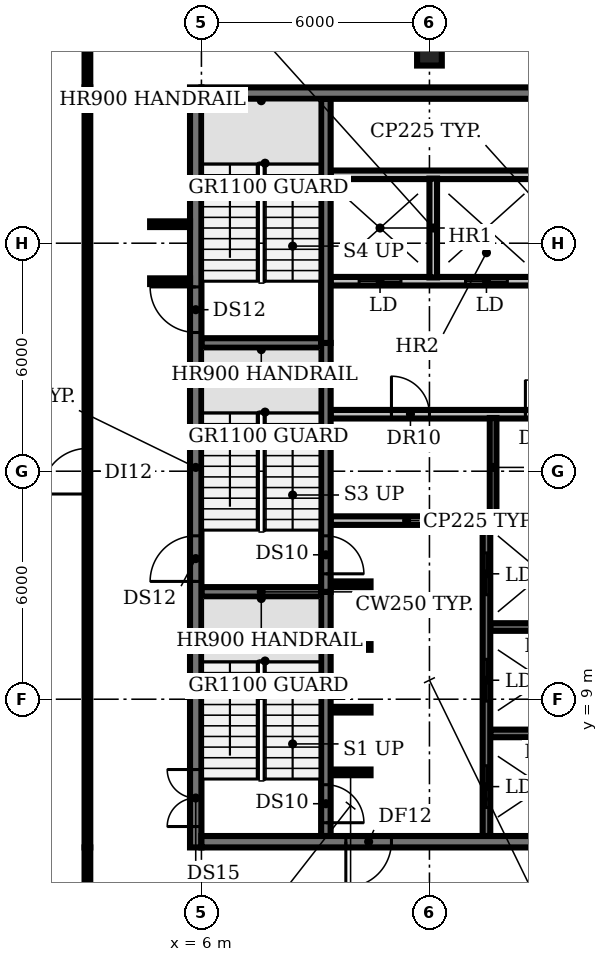
"""IFC4 building model, lengths in metres.
Left out: names, types, materials, properties, quantities, classifications, styles, units other than length and angle.
Written with IfcOpenShell. Run it as: python <this file> out.ifc"""

import sys

from ifc_helpers import new_model, si_unit, direction, frame, frame_2d, origin, origin_2d, place, context, subcontext, project, spatial, rectangle, extrude, element, fill, save


model = new_model("IFC4")
c1 = context("Model", 3, precision=1e-05, world=origin(), true_north=direction((0.0, 1.0)))
c2 = subcontext(c1, "Body", "Model", "MODEL_VIEW")
j1 = project(units=[si_unit("LENGTHUNIT", "METRE"), si_unit("PLANEANGLEUNIT", "RADIAN")], contexts=[c1])
p1 = place(None, origin())
s1 = spatial("IfcSite", under=j1, at=p1, CompositionType="ELEMENT")
p2 = place(p1, origin())
s2 = spatial("IfcBuilding", under=s1, at=p2, CompositionType="ELEMENT")
p3 = place(p2, frame((0.0, 0.0, 310.4)))
s3 = spatial("IfcBuildingStorey", under=s2, at=p3, CompositionType="ELEMENT", Elevation=310.4)
p4 = place(p3, frame((12.0, 26.0, 0.0), z_axis=(0.0, 0.0, 1.0), x_axis=(1.0, 0.0, 0.0)))
e1 = element("IfcColumn", 1, at=p4, inside=s3, PredefinedType="COLUMN", context=c2, shape_type="SweptSolid", body=[
    extrude(rectangle(XDim=0.65, YDim=0.65, at=origin_2d()), origin(), (0.0, 0.0, 1.0), 3.9),
])
p5 = place(p3, frame((9.4, 7.075, 0.0), z_axis=(0.0, 0.0, 1.0), x_axis=(1.0, 0.0, 0.0)))
e2 = element("IfcWall", 2, at=p5, inside=s3, PredefinedType="SHEAR", context=c2, shape_type="SweptSolid", body=[
    extrude(rectangle(XDim=1.05, YDim=0.15, at=frame_2d((0.525, 0.0))), origin(), (0.0, 0.0, 1.0), 3.9),
])
p6 = place(p3, frame((13.6, 8.1, 0.0), z_axis=(0.0, 0.0, 1.0), x_axis=(1.0, 0.0, 0.0)))
e3 = element("IfcWall", 3, at=p6, inside=s3, PredefinedType="SHEAR", context=c2, shape_type="SweptSolid", body=[
    extrude(rectangle(XDim=2.8, YDim=0.2, at=frame_2d((1.4, 0.0))), origin(), (0.0, 0.0, 1.0), 3.9),
])
for number, where, z_axis, x_axis in (
    (4, (9.4, 8.725, 0.0), (0.0, 0.0, 1.0), (1.0, 0.0, 0.0)),
    (5, (9.4, 10.375, 0.0), (0.0, 0.0, 1.0), (1.0, 0.0, 0.0)),
):
    element("IfcWall", number, at=place(p3, frame(where, z_axis=z_axis, x_axis=x_axis)), inside=s3, PredefinedType="SHEAR", context=c2, shape_type="SweptSolid", body=[
        extrude(rectangle(XDim=1.05, YDim=0.15, at=frame_2d((0.525, 0.0))), origin(), (0.0, 0.0, 1.0), 3.9),
    ])
p7 = place(p3, frame((13.6, 10.9, 0.0), z_axis=(0.0, 0.0, 1.0), x_axis=(1.0, 0.0, 0.0)))
e6 = element("IfcWall", 6, at=p7, inside=s3, PredefinedType="SHEAR", context=c2, shape_type="SweptSolid", body=[
    extrude(rectangle(XDim=2.8, YDim=0.2, at=frame_2d((1.4, 0.0))), origin(), (0.0, 0.0, 1.0), 3.9),
])
p8 = place(p3, frame((6.0, 11.825, 0.0), z_axis=(0.0, 0.0, 1.0), x_axis=(1.0, 0.0, 0.0)))
e7 = element("IfcWall", 7, at=p8, inside=s3, PredefinedType="SHEAR", context=c2, shape_type="SweptSolid", body=[
    extrude(rectangle(XDim=3.15, YDim=0.25, at=frame_2d((1.575, 0.0))), origin(), (0.0, 0.0, 1.0), 3.9),
])
p9 = place(p3, frame((9.4, 12.025, 0.0), z_axis=(0.0, 0.0, 1.0), x_axis=(1.0, 0.0, 0.0)))
e8 = element("IfcWall", 8, at=p9, inside=s3, PredefinedType="SHEAR", context=c2, shape_type="SweptSolid", body=[
    extrude(rectangle(XDim=1.05, YDim=0.15, at=frame_2d((0.525, 0.0))), origin(), (0.0, 0.0, 1.0), 3.9),
])
p10 = place(p3, frame((9.4, 13.7, 0.0), z_axis=(0.0, 0.0, 1.0), x_axis=(1.0, 0.0, 0.0)))
e9 = element("IfcWall", 9, at=p10, inside=s3, PredefinedType="PARTITIONING", context=c2, shape_type="SweptSolid", body=[
    extrude(rectangle(XDim=4.0, YDim=0.225, at=frame_2d((2.0, 0.0))), origin(), (0.0, 0.0, 1.0), 3.9),
])
p11 = place(p3, frame((13.75, 13.7, 0.0), z_axis=(0.0, 0.0, 1.0), x_axis=(1.0, 0.0, 0.0)))
e10 = element("IfcWall", 10, at=p11, inside=s3, PredefinedType="SHEAR", context=c2, shape_type="SweptSolid", body=[
    extrude(rectangle(XDim=2.45, YDim=0.2, at=frame_2d((1.225, 0.0))), origin(), (0.0, 0.0, 1.0), 3.9),
])
p12 = place(p3, frame((9.4, 16.5, 0.0), z_axis=(0.0, 0.0, 1.0), x_axis=(1.0, 0.0, 0.0)))
e11 = element("IfcWall", 11, at=p12, inside=s3, PredefinedType="PARTITIONING", context=c2, shape_type="SweptSolid", body=[
    extrude(rectangle(XDim=14.6, YDim=0.225, at=frame_2d((7.3, 0.0))), origin(), (0.0, 0.0, 1.0), 3.9),
])
p13 = place(p12, frame((1.6, 0.0, 0.0)))
e12 = element("IfcOpeningElement", 12, at=p13, cuts=e11, PredefinedType="OPENING", context=c2, shape_type="SweptSolid", body=[
    extrude(rectangle(XDim=1.0, YDim=2.1, at=frame_2d((0.5, 1.05))), frame((0.0, 0.123, 0.0), z_axis=(0.0, -1.0, 0.0), x_axis=(1.0, 0.0, 0.0)), (0.0, 0.0, 1.0), 0.245),
])
p14 = place(p12, frame((5.125, 0.0, 0.0)))
e13 = element("IfcOpeningElement", 13, at=p14, cuts=e11, PredefinedType="OPENING", context=c2, shape_type="SweptSolid", body=[
    extrude(rectangle(XDim=0.9, YDim=2.1, at=frame_2d((0.45, 1.05))), frame((0.0, 0.123, 0.0), z_axis=(0.0, -1.0, 0.0), x_axis=(1.0, 0.0, 0.0)), (0.0, 0.0, 1.0), 0.245),
])
p15 = place(p12, frame((7.675, 0.0, 0.0)))
e14 = element("IfcOpeningElement", 14, at=p15, cuts=e11, PredefinedType="OPENING", context=c2, shape_type="SweptSolid", body=[
    extrude(rectangle(XDim=0.9, YDim=2.1, at=frame_2d((0.45, 1.05))), frame((0.0, 0.123, 0.0), z_axis=(0.0, -1.0, 0.0), x_axis=(1.0, 0.0, 0.0)), (0.0, 0.0, 1.0), 0.245),
])
p16 = place(p12, frame((9.775, 0.0, 0.0)))
e15 = element("IfcOpeningElement", 15, at=p16, cuts=e11, PredefinedType="OPENING", context=c2, shape_type="SweptSolid", body=[
    extrude(rectangle(XDim=0.9, YDim=2.1, at=frame_2d((0.45, 1.05))), frame((0.0, 0.123, 0.0), z_axis=(0.0, -1.0, 0.0), x_axis=(1.0, 0.0, 0.0)), (0.0, 0.0, 1.0), 0.245),
])
p17 = place(p12, frame((12.4, 0.0, 0.0)))
e16 = element("IfcOpeningElement", 16, at=p17, cuts=e11, PredefinedType="OPENING", context=c2, shape_type="SweptSolid", body=[
    extrude(rectangle(XDim=1.0, YDim=2.1, at=frame_2d((0.5, 1.05))), frame((0.0, 0.123, 0.0), z_axis=(0.0, -1.0, 0.0), x_axis=(1.0, 0.0, 0.0)), (0.0, 0.0, 1.0), 0.245),
])
p18 = place(p3, frame((6.0, 18.375, 0.0), z_axis=(0.0, 0.0, 1.0), x_axis=(1.0, 0.0, 0.0)))
e17 = element("IfcWall", 17, at=p18, inside=s3, PredefinedType="SHEAR", context=c2, shape_type="SweptSolid", body=[
    extrude(rectangle(XDim=3.15, YDim=0.25, at=frame_2d((1.575, 0.0))), origin(), (0.0, 0.0, 1.0), 3.9),
])
p19 = place(p3, frame((24.0, 20.0, 0.0), z_axis=(0.0, 0.0, 1.0), x_axis=(-1.0, 0.0, 0.0)))
e18 = element("IfcWall", 18, at=p19, inside=s3, PredefinedType="PARTITIONING", context=c2, shape_type="SweptSolid", body=[
    extrude(rectangle(XDim=14.6, YDim=0.225, at=frame_2d((7.3, 0.0))), origin(), (0.0, 0.0, 1.0), 3.9),
])
p20 = place(p19, frame((12.75, 0.0, 0.0)))
e19 = element("IfcOpeningElement", 19, at=p20, cuts=e18, PredefinedType="OPENING", context=c2, shape_type="SweptSolid", body=[
    extrude(rectangle(XDim=1.1, YDim=2.1, at=frame_2d((0.55, 1.05))), frame((0.0, 0.123, 0.0), z_axis=(0.0, -1.0, 0.0), x_axis=(1.0, 0.0, 0.0)), (0.0, 0.0, 1.0), 0.245),
])
p21 = place(p19, frame((9.95, 0.0, 0.0)))
e20 = element("IfcOpeningElement", 20, at=p21, cuts=e18, PredefinedType="OPENING", context=c2, shape_type="SweptSolid", body=[
    extrude(rectangle(XDim=1.1, YDim=2.1, at=frame_2d((0.55, 1.05))), frame((0.0, 0.123, 0.0), z_axis=(0.0, -1.0, 0.0), x_axis=(1.0, 0.0, 0.0)), (0.0, 0.0, 1.0), 0.245),
])
p22 = place(p19, frame((7.15, 0.0, 0.0)))
e21 = element("IfcOpeningElement", 21, at=p22, cuts=e18, PredefinedType="OPENING", context=c2, shape_type="SweptSolid", body=[
    extrude(rectangle(XDim=1.1, YDim=2.1, at=frame_2d((0.55, 1.05))), frame((0.0, 0.123, 0.0), z_axis=(0.0, -1.0, 0.0), x_axis=(1.0, 0.0, 0.0)), (0.0, 0.0, 1.0), 0.245),
])
p23 = place(p19, frame((4.35, 0.0, 0.0)))
e22 = element("IfcOpeningElement", 22, at=p23, cuts=e18, PredefinedType="OPENING", context=c2, shape_type="SweptSolid", body=[
    extrude(rectangle(XDim=1.1, YDim=2.1, at=frame_2d((0.55, 1.05))), frame((0.0, 0.123, 0.0), z_axis=(0.0, -1.0, 0.0), x_axis=(1.0, 0.0, 0.0)), (0.0, 0.0, 1.0), 0.245),
])
p24 = place(p19, frame((1.2, 0.0, 0.0)))
e23 = element("IfcOpeningElement", 23, at=p24, cuts=e18, PredefinedType="OPENING", context=c2, shape_type="SweptSolid", body=[
    extrude(rectangle(XDim=1.0, YDim=2.1, at=frame_2d((0.5, 1.05))), frame((0.0, 0.123, 0.0), z_axis=(0.0, -1.0, 0.0), x_axis=(1.0, 0.0, 0.0)), (0.0, 0.0, 1.0), 0.245),
])
p25 = place(p3, frame((9.4, 22.8, 0.0), z_axis=(0.0, 0.0, 1.0), x_axis=(1.0, 0.0, 0.0)))
e24 = element("IfcWall", 24, at=p25, inside=s3, PredefinedType="PARTITIONING", context=c2, shape_type="SweptSolid", body=[
    extrude(rectangle(XDim=14.6, YDim=0.225, at=frame_2d((7.3, 0.0))), origin(), (0.0, 0.0, 1.0), 3.9),
])
p26 = place(p3, frame((9.275, 11.825, 0.0), z_axis=(0.0, 0.0, 1.0), x_axis=(0.0, -1.0, 0.0)))
e25 = element("IfcWall", 25, at=p26, inside=s3, PredefinedType="SHEAR", context=c2, shape_type="SweptSolid", body=[
    extrude(rectangle(XDim=6.425, YDim=0.25, at=frame_2d((3.212, 0.0))), origin(), (0.0, 0.0, 1.0), 3.9),
])
p27 = place(p26, frame((5.075, 0.0, 0.0)))
e26 = element("IfcOpeningElement", 26, at=p27, cuts=e25, PredefinedType="OPENING", context=c2, shape_type="SweptSolid", body=[
    extrude(rectangle(XDim=1.0, YDim=2.1, at=frame_2d((0.5, 1.05))), frame((0.0, 0.135, 0.0), z_axis=(0.0, -1.0, 0.0), x_axis=(1.0, 0.0, 0.0)), (0.0, 0.0, 1.0), 0.27),
])
p28 = place(p3, frame((9.275, 18.375, 0.0), z_axis=(0.0, 0.0, 1.0), x_axis=(0.0, -1.0, 0.0)))
e27 = element("IfcWall", 27, at=p28, inside=s3, PredefinedType="SHEAR", context=c2, shape_type="SweptSolid", body=[
    extrude(rectangle(XDim=6.55, YDim=0.25, at=frame_2d((3.275, 0.0))), origin(), (0.0, 0.0, 1.0), 3.9),
])
p29 = place(p28, frame((5.075, 0.0, 0.0)))
e28 = element("IfcOpeningElement", 28, at=p29, cuts=e27, PredefinedType="OPENING", context=c2, shape_type="SweptSolid", body=[
    extrude(rectangle(XDim=1.0, YDim=2.1, at=frame_2d((0.5, 1.05))), frame((0.0, 0.135, 0.0), z_axis=(0.0, -1.0, 0.0), x_axis=(1.0, 0.0, 0.0)), (0.0, 0.0, 1.0), 0.27),
])
p30 = place(p3, frame((9.275, 18.375, 0.0), z_axis=(0.0, 0.0, 1.0), x_axis=(0.0, 1.0, 0.0)))
e29 = element("IfcWall", 29, at=p30, inside=s3, PredefinedType="SHEAR", context=c2, shape_type="SweptSolid", body=[
    extrude(rectangle(XDim=6.425, YDim=0.25, at=frame_2d((3.212, 0.0))), origin(), (0.0, 0.0, 1.0), 3.9),
])
p31 = place(p3, frame((12.1, 20.1, 0.0), z_axis=(0.0, 0.0, 1.0), x_axis=(0.0, 1.0, 0.0)))
e30 = element("IfcWall", 30, at=p31, inside=s3, PredefinedType="SOLIDWALL", context=c2, shape_type="SweptSolid", body=[
    extrude(rectangle(XDim=2.6, YDim=0.2, at=frame_2d((1.3, 0.0))), origin(), (0.0, 0.0, 1.0), 3.9),
])
p32 = place(p3, frame((13.5, 5.4, 0.0), z_axis=(0.0, 0.0, 1.0), x_axis=(0.0, 1.0, 0.0)))
e31 = element("IfcWall", 31, at=p32, inside=s3, PredefinedType="SHEAR", context=c2, shape_type="SweptSolid", body=[
    extrude(rectangle(XDim=8.2, YDim=0.2, at=frame_2d((4.1, 0.0))), origin(), (0.0, 0.0, 1.0), 3.9),
])
p33 = place(p32, frame((0.75, 0.0, 0.0)))
e32 = element("IfcOpeningElement", 32, at=p33, cuts=e31, PredefinedType="OPENING", context=c2, shape_type="SweptSolid", body=[
    extrude(rectangle(XDim=1.1, YDim=2.1, at=frame_2d((0.55, 1.05))), frame((0.0, 0.11, 0.0), z_axis=(0.0, -1.0, 0.0), x_axis=(1.0, 0.0, 0.0)), (0.0, 0.0, 1.0), 0.22),
])
p34 = place(p32, frame((3.55, 0.0, 0.0)))
e33 = element("IfcOpeningElement", 33, at=p34, cuts=e31, PredefinedType="OPENING", context=c2, shape_type="SweptSolid", body=[
    extrude(rectangle(XDim=1.1, YDim=2.1, at=frame_2d((0.55, 1.05))), frame((0.0, 0.11, 0.0), z_axis=(0.0, -1.0, 0.0), x_axis=(1.0, 0.0, 0.0)), (0.0, 0.0, 1.0), 0.22),
])
p35 = place(p32, frame((6.35, 0.0, 0.0)))
e34 = element("IfcOpeningElement", 34, at=p35, cuts=e31, PredefinedType="OPENING", context=c2, shape_type="SweptSolid", body=[
    extrude(rectangle(XDim=1.1, YDim=2.1, at=frame_2d((0.55, 1.05))), frame((0.0, 0.11, 0.0), z_axis=(0.0, -1.0, 0.0), x_axis=(1.0, 0.0, 0.0)), (0.0, 0.0, 1.0), 0.22),
])
p36 = place(p3, frame((13.675, 13.8, 0.0), z_axis=(0.0, 0.0, 1.0), x_axis=(0.0, 1.0, 0.0)))
e35 = element("IfcWall", 35, at=p36, inside=s3, PredefinedType="PARTITIONING", context=c2, shape_type="SweptSolid", body=[
    extrude(rectangle(XDim=2.6, YDim=0.175, at=frame_2d((1.3, 0.0))), origin(), (0.0, 0.0, 1.0), 3.9),
])
p37 = place(p3, frame((5.85, 5.1, 0.0), z_axis=(0.0, 0.0, 1.0), x_axis=(0.0, 1.0, 0.0)))
e36 = element("IfcWall", 36, at=p37, inside=s3, PredefinedType="SHEAR", context=c2, shape_type="SweptSolid", body=[
    extrude(rectangle(XDim=20.0, YDim=0.3, at=frame_2d((10.0, 0.0))), origin(), (0.0, 0.0, 1.0), 3.9),
])
p38 = place(p37, frame((0.55, 0.0, 0.0)))
e37 = element("IfcOpeningElement", 37, at=p38, cuts=e36, PredefinedType="OPENING", context=c2, shape_type="SweptSolid", body=[
    extrude(rectangle(XDim=1.5, YDim=2.1, at=frame_2d((0.75, 1.05))), frame((0.0, 0.16, 0.0), z_axis=(0.0, -1.0, 0.0), x_axis=(1.0, 0.0, 0.0)), (0.0, 0.0, 1.0), 0.32),
])
p39 = place(p37, frame((7.0, 0.0, 0.0)))
e38 = element("IfcOpeningElement", 38, at=p39, cuts=e36, PredefinedType="OPENING", context=c2, shape_type="SweptSolid", body=[
    extrude(rectangle(XDim=1.2, YDim=2.1, at=frame_2d((0.6, 1.05))), frame((0.0, 0.16, 0.0), z_axis=(0.0, -1.0, 0.0), x_axis=(1.0, 0.0, 0.0)), (0.0, 0.0, 1.0), 0.32),
])
p40 = place(p37, frame((13.55, 0.0, 0.0)))
e39 = element("IfcOpeningElement", 39, at=p40, cuts=e36, PredefinedType="OPENING", context=c2, shape_type="SweptSolid", body=[
    extrude(rectangle(XDim=1.2, YDim=2.1, at=frame_2d((0.6, 1.05))), frame((0.0, 0.16, 0.0), z_axis=(0.0, -1.0, 0.0), x_axis=(1.0, 0.0, 0.0)), (0.0, 0.0, 1.0), 0.32),
])
p41 = place(p3, frame((24.0, 5.25, 0.0), z_axis=(0.0, 0.0, 1.0), x_axis=(-1.0, 0.0, 0.0)))
e40 = element("IfcWall", 40, at=p41, inside=s3, PredefinedType="SHEAR", context=c2, shape_type="SweptSolid", body=[
    extrude(rectangle(XDim=18.0, YDim=0.3, at=frame_2d((9.0, 0.0))), origin(), (0.0, 0.0, 1.0), 3.9),
])
p42 = place(p41, frame((13.0, 0.0, 0.0)))
e41 = element("IfcOpeningElement", 41, at=p42, cuts=e40, PredefinedType="OPENING", context=c2, shape_type="SweptSolid", body=[
    extrude(rectangle(XDim=1.2, YDim=2.1, at=frame_2d((0.6, 1.05))), frame((0.0, 0.16, 0.0), z_axis=(0.0, -1.0, 0.0), x_axis=(1.0, 0.0, 0.0)), (0.0, 0.0, 1.0), 0.32),
])
p43 = place(p41, frame((4.9, 0.0, 0.0)))
e42 = element("IfcOpeningElement", 42, at=p43, cuts=e40, PredefinedType="OPENING", context=c2, shape_type="SweptSolid", body=[
    extrude(rectangle(XDim=1.0, YDim=2.1, at=frame_2d((0.5, 1.05))), frame((0.0, 0.16, 0.0), z_axis=(0.0, -1.0, 0.0), x_axis=(1.0, 0.0, 0.0)), (0.0, 0.0, 1.0), 0.32),
])
p44 = place(p3, frame((6.0, 24.95, 0.0), z_axis=(0.0, 0.0, 1.0), x_axis=(1.0, 0.0, 0.0)))
e43 = element("IfcWall", 43, at=p44, inside=s3, PredefinedType="SHEAR", context=c2, shape_type="SweptSolid", body=[
    extrude(rectangle(XDim=18.0, YDim=0.3, at=frame_2d((9.0, 0.0))), origin(), (0.0, 0.0, 1.0), 3.9),
])
p45 = place(p3, frame((3.0, 1.2, 0.0), z_axis=(0.0, 0.0, 1.0), x_axis=(0.0, 1.0, 0.0)))
e44 = element("IfcWall", 44, at=p45, inside=s3, PredefinedType="PARTITIONING", context=c2, shape_type="SweptSolid", body=[
    extrude(rectangle(XDim=3.9, YDim=0.15, at=frame_2d((1.95, 0.0))), origin(), (0.0, 0.0, 1.0), 2.48),
])
p46 = place(p3, frame((3.0, 5.1, 0.0), z_axis=(0.0, 0.0, 1.0), x_axis=(0.0, 1.0, 0.0)))
e45 = element("IfcWall", 45, at=p46, inside=s3, PredefinedType="PARTITIONING", context=c2, shape_type="SweptSolid", body=[
    extrude(rectangle(XDim=20.0, YDim=0.15, at=frame_2d((10.0, 0.0))), origin(), (0.0, 0.0, 1.0), 2.48),
])
p47 = place(p46, frame((9.3, 0.0, 0.0)))
e46 = element("IfcOpeningElement", 46, at=p47, cuts=e45, PredefinedType="OPENING", context=c2, shape_type="SweptSolid", body=[
    extrude(rectangle(XDim=1.2, YDim=2.1, at=frame_2d((0.6, 1.05))), frame((0.0, 0.085, 0.0), z_axis=(0.0, -1.0, 0.0), x_axis=(1.0, 0.0, 0.0)), (0.0, 0.0, 1.0), 0.17),
])
p48 = place(p3, frame((3.0, 25.1, 0.0), z_axis=(0.0, 0.0, 1.0), x_axis=(0.0, 1.0, 0.0)))
e47 = element("IfcWall", 47, at=p48, inside=s3, PredefinedType="PARTITIONING", context=c2, shape_type="SweptSolid", body=[
    extrude(rectangle(XDim=3.9, YDim=0.15, at=frame_2d((1.95, 0.0))), origin(), (0.0, 0.0, 1.0), 2.48),
])
for number, where, z_axis, x_axis in (
    (48, (4.65, 20.0, 0.0), (0.0, 0.0, 1.0), (1.0, 0.0, 0.0)),
    (49, (4.65, 21.5, 0.0), (0.0, 0.0, 1.0), (1.0, 0.0, 0.0)),
):
    element("IfcWall", number, at=place(p3, frame(where, z_axis=z_axis, x_axis=x_axis)), inside=s3, PredefinedType="PARTITIONING", context=c2, shape_type="SweptSolid", body=[
        extrude(rectangle(XDim=1.05, YDim=0.15, at=frame_2d((0.525, 0.0))), origin(), (0.0, 0.0, 1.0), 2.48),
    ])
p49 = place(p13, origin())
e50 = element("IfcDoor", 50, at=p49, inside=s3, OperationType="SINGLE_SWING_LEFT", PredefinedType="DOOR", context=c2, shape_type="SweptSolid", body=[
    extrude(rectangle(XDim=1.0, YDim=2.1, at=frame_2d((0.5, 1.05))), frame((0.0, 0.025, 0.0), z_axis=(0.0, -1.0, 0.0), x_axis=(1.0, 0.0, 0.0)), (0.0, 0.0, 1.0), 0.05),
])
fill(e12, e50)
p50 = place(p14, origin())
e51 = element("IfcDoor", 51, at=p50, inside=s3, OperationType="SINGLE_SWING_LEFT", PredefinedType="DOOR", context=c2, shape_type="SweptSolid", body=[
    extrude(rectangle(XDim=0.9, YDim=2.1, at=frame_2d((0.45, 1.05))), frame((0.0, 0.025, 0.0), z_axis=(0.0, -1.0, 0.0), x_axis=(1.0, 0.0, 0.0)), (0.0, 0.0, 1.0), 0.05),
])
fill(e13, e51)
p51 = place(p20, origin())
e52 = element("IfcDoor", 52, at=p51, inside=s3, OperationType="DOUBLE_DOOR_SLIDING", PredefinedType="DOOR", context=c2, shape_type="SweptSolid", body=[
    extrude(rectangle(XDim=1.1, YDim=2.1, at=frame_2d((0.55, 1.05))), frame((0.0, 0.025, 0.0), z_axis=(0.0, -1.0, 0.0), x_axis=(1.0, 0.0, 0.0)), (0.0, 0.0, 1.0), 0.05),
])
fill(e19, e52)
p52 = place(p21, origin())
e53 = element("IfcDoor", 53, at=p52, inside=s3, OperationType="DOUBLE_DOOR_SLIDING", PredefinedType="DOOR", context=c2, shape_type="SweptSolid", body=[
    extrude(rectangle(XDim=1.1, YDim=2.1, at=frame_2d((0.55, 1.05))), frame((0.0, 0.025, 0.0), z_axis=(0.0, -1.0, 0.0), x_axis=(1.0, 0.0, 0.0)), (0.0, 0.0, 1.0), 0.05),
])
fill(e20, e53)
p53 = place(p27, origin())
e54 = element("IfcDoor", 54, at=p53, inside=s3, OperationType="SINGLE_SWING_RIGHT", PredefinedType="DOOR", context=c2, shape_type="SweptSolid", body=[
    extrude(rectangle(XDim=1.0, YDim=2.1, at=frame_2d((0.5, 1.05))), frame((0.0, 0.025, 0.0), z_axis=(0.0, -1.0, 0.0), x_axis=(1.0, 0.0, 0.0)), (0.0, 0.0, 1.0), 0.05),
])
fill(e26, e54)
p54 = place(p29, origin())
e55 = element("IfcDoor", 55, at=p54, inside=s3, OperationType="SINGLE_SWING_RIGHT", PredefinedType="DOOR", context=c2, shape_type="SweptSolid", body=[
    extrude(rectangle(XDim=1.0, YDim=2.1, at=frame_2d((0.5, 1.05))), frame((0.0, 0.025, 0.0), z_axis=(0.0, -1.0, 0.0), x_axis=(1.0, 0.0, 0.0)), (0.0, 0.0, 1.0), 0.05),
])
fill(e28, e55)
p55 = place(p33, origin())
e56 = element("IfcDoor", 56, at=p55, inside=s3, OperationType="DOUBLE_DOOR_SLIDING", PredefinedType="DOOR", context=c2, shape_type="SweptSolid", body=[
    extrude(rectangle(XDim=1.1, YDim=2.1, at=frame_2d((0.55, 1.05))), frame((0.0, 0.025, 0.0), z_axis=(0.0, -1.0, 0.0), x_axis=(1.0, 0.0, 0.0)), (0.0, 0.0, 1.0), 0.05),
])
fill(e32, e56)
p56 = place(p34, origin())
e57 = element("IfcDoor", 57, at=p56, inside=s3, OperationType="DOUBLE_DOOR_SLIDING", PredefinedType="DOOR", context=c2, shape_type="SweptSolid", body=[
    extrude(rectangle(XDim=1.1, YDim=2.1, at=frame_2d((0.55, 1.05))), frame((0.0, 0.025, 0.0), z_axis=(0.0, -1.0, 0.0), x_axis=(1.0, 0.0, 0.0)), (0.0, 0.0, 1.0), 0.05),
])
fill(e33, e57)
p57 = place(p35, origin())
e58 = element("IfcDoor", 58, at=p57, inside=s3, OperationType="DOUBLE_DOOR_SLIDING", PredefinedType="DOOR", context=c2, shape_type="SweptSolid", body=[
    extrude(rectangle(XDim=1.1, YDim=2.1, at=frame_2d((0.55, 1.05))), frame((0.0, 0.025, 0.0), z_axis=(0.0, -1.0, 0.0), x_axis=(1.0, 0.0, 0.0)), (0.0, 0.0, 1.0), 0.05),
])
fill(e34, e58)
p58 = place(p38, origin())
e59 = element("IfcDoor", 59, at=p58, inside=s3, OperationType="DOUBLE_DOOR_SINGLE_SWING", PredefinedType="DOOR", context=c2, shape_type="SweptSolid", body=[
    extrude(rectangle(XDim=1.5, YDim=2.1, at=frame_2d((0.75, 1.05))), frame((0.0, 0.025, 0.0), z_axis=(0.0, -1.0, 0.0), x_axis=(1.0, 0.0, 0.0)), (0.0, 0.0, 1.0), 0.05),
])
fill(e37, e59)
p59 = place(p39, origin())
e60 = element("IfcDoor", 60, at=p59, inside=s3, OperationType="SINGLE_SWING_LEFT", PredefinedType="DOOR", context=c2, shape_type="SweptSolid", body=[
    extrude(rectangle(XDim=1.2, YDim=2.1, at=frame_2d((0.6, 1.05))), frame((0.0, 0.025, 0.0), z_axis=(0.0, -1.0, 0.0), x_axis=(1.0, 0.0, 0.0)), (0.0, 0.0, 1.0), 0.05),
])
fill(e38, e60)
p60 = place(p40, origin())
e61 = element("IfcDoor", 61, at=p60, inside=s3, OperationType="SINGLE_SWING_RIGHT", PredefinedType="DOOR", context=c2, shape_type="SweptSolid", body=[
    extrude(rectangle(XDim=1.2, YDim=2.1, at=frame_2d((0.6, 1.05))), frame((0.0, 0.025, 0.0), z_axis=(0.0, -1.0, 0.0), x_axis=(1.0, 0.0, 0.0)), (0.0, 0.0, 1.0), 0.05),
])
fill(e39, e61)
p61 = place(p42, origin())
e62 = element("IfcDoor", 62, at=p61, inside=s3, OperationType="SINGLE_SWING_RIGHT", PredefinedType="DOOR", context=c2, shape_type="SweptSolid", body=[
    extrude(rectangle(XDim=1.2, YDim=2.1, at=frame_2d((0.6, 1.05))), frame((0.0, 0.025, 0.0), z_axis=(0.0, -1.0, 0.0), x_axis=(1.0, 0.0, 0.0)), (0.0, 0.0, 1.0), 0.05),
])
fill(e41, e62)
p62 = place(p47, origin())
e63 = element("IfcDoor", 63, at=p62, inside=s3, OperationType="SINGLE_SWING_LEFT", PredefinedType="DOOR", context=c2, shape_type="SweptSolid", body=[
    extrude(rectangle(XDim=1.2, YDim=2.1, at=frame_2d((0.6, 1.05))), frame((0.0, 0.025, 0.0), z_axis=(0.0, -1.0, 0.0), x_axis=(1.0, 0.0, 0.0)), (0.0, 0.0, 1.0), 0.05),
])
fill(e46, e63)
save(model, sys.argv[1])
